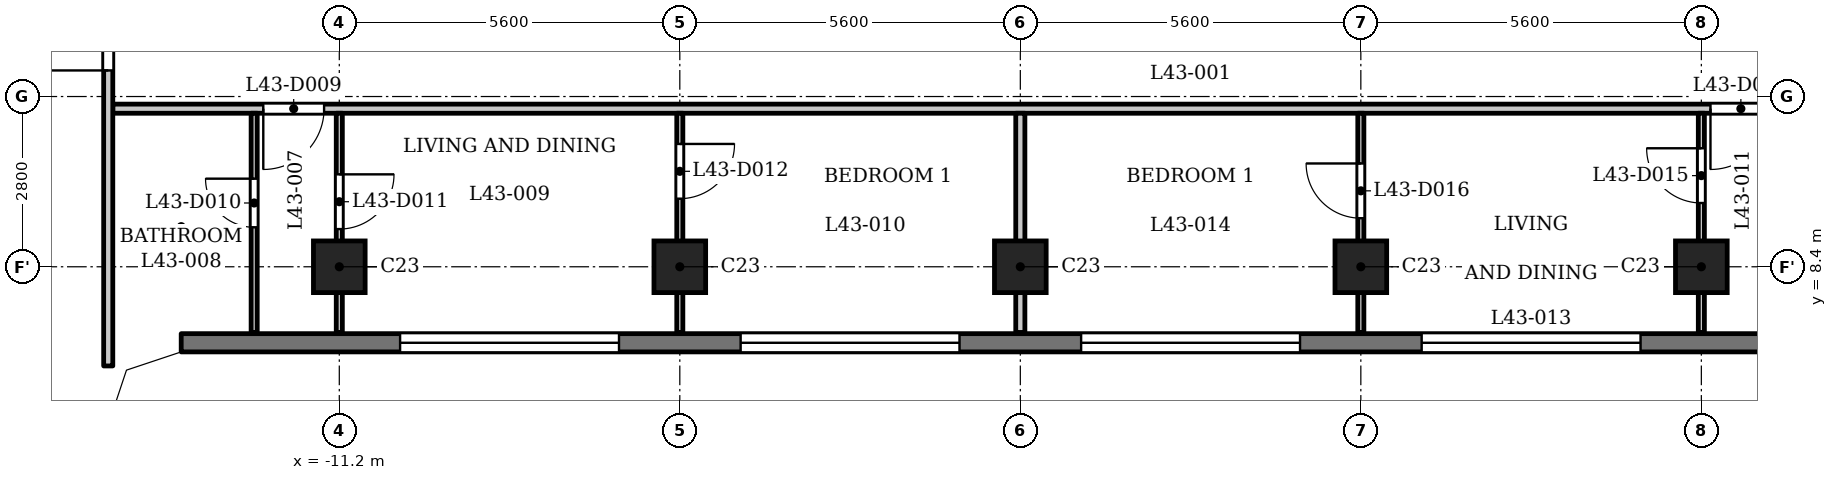
"""IFC4 building model, lengths in metres.
Left out: names, types, materials, properties, quantities, classifications, styles, units other than length and angle.
Written with IfcOpenShell. Run it as: python <this file> out.ifc"""

import sys

from ifc_helpers import new_model, si_unit, direction, frame, frame_2d, origin, origin_2d, place, context, subcontext, project, spatial, polyline, rectangle, outline, extrude, element, fill, save


model = new_model("IFC4")
c1 = context("Model", 3, precision=1e-05, world=origin(), true_north=direction((0.0, 1.0)))
c2 = subcontext(c1, "Body", "Model", "MODEL_VIEW")
j1 = project(units=[si_unit("LENGTHUNIT", "METRE"), si_unit("PLANEANGLEUNIT", "RADIAN")], contexts=[c1])
p1 = place(None, origin())
s1 = spatial("IfcSite", under=j1, at=p1, CompositionType="ELEMENT")
p2 = place(p1, origin())
s2 = spatial("IfcBuilding", under=s1, at=p2, CompositionType="ELEMENT")
p3 = place(p2, frame((0.0, 0.0, 167.6)))
s3 = spatial("IfcBuildingStorey", under=s2, at=p3, CompositionType="ELEMENT", Elevation=167.6)
for number, where, z_axis, x_axis in (
    (1, (-11.2, 8.4, 0.0), (0.0, 0.0, 1.0), (1.0, 0.0, 0.0)),
    (2, (-5.6, 8.4, 0.0), (0.0, 0.0, 1.0), (1.0, 0.0, 0.0)),
    (3, (0.0, 8.4, 0.0), (0.0, 0.0, 1.0), (1.0, 0.0, 0.0)),
    (4, (5.6, 8.4, 0.0), (0.0, 0.0, 1.0), (1.0, 0.0, 0.0)),
    (5, (11.2, 8.4, 0.0), (0.0, 0.0, 1.0), (1.0, 0.0, 0.0)),
):
    element("IfcColumn", number, at=place(p3, frame(where, z_axis=z_axis, x_axis=x_axis)), inside=s3, PredefinedType="COLUMN", context=c2, shape_type="SweptSolid", body=[
        extrude(rectangle(XDim=0.85, YDim=0.85, at=origin_2d()), origin(), (0.0, 0.0, 1.0), 3.5),
    ])
p4 = place(p3, frame((-13.8, 7.15, 0.0), z_axis=(0.0, 0.0, 1.0), x_axis=(1.0, 0.0, 0.0)))
e6 = element("IfcWall", 6, at=p4, inside=s3, PredefinedType="SOLIDWALL", context=c2, shape_type="SweptSolid", body=[
    extrude(rectangle(XDim=27.6, YDim=0.3, at=frame_2d((13.8, 0.0))), origin(), (0.0, 0.0, 1.0), 3.2),
])
p5 = place(p4, frame((3.6, 0.0, 1.2)))
e7 = element("IfcOpeningElement", 7, at=p5, cuts=e6, PredefinedType="OPENING", context=c2, shape_type="SweptSolid", body=[
    extrude(rectangle(XDim=3.6, YDim=0.95, at=frame_2d((1.8, 0.475))), frame((0.0, 0.16, 0.0), z_axis=(0.0, -1.0, 0.0), x_axis=(1.0, 0.0, 0.0)), (0.0, 0.0, 1.0), 0.32),
])
p6 = place(p4, frame((9.2, 0.0, 1.2)))
e8 = element("IfcOpeningElement", 8, at=p6, cuts=e6, PredefinedType="OPENING", context=c2, shape_type="SweptSolid", body=[
    extrude(rectangle(XDim=3.6, YDim=0.95, at=frame_2d((1.8, 0.475))), frame((0.0, 0.16, 0.0), z_axis=(0.0, -1.0, 0.0), x_axis=(1.0, 0.0, 0.0)), (0.0, 0.0, 1.0), 0.32),
])
p7 = place(p4, frame((14.8, 0.0, 1.2)))
e9 = element("IfcOpeningElement", 9, at=p7, cuts=e6, PredefinedType="OPENING", context=c2, shape_type="SweptSolid", body=[
    extrude(rectangle(XDim=3.6, YDim=0.95, at=frame_2d((1.8, 0.475))), frame((0.0, 0.16, 0.0), z_axis=(0.0, -1.0, 0.0), x_axis=(1.0, 0.0, 0.0)), (0.0, 0.0, 1.0), 0.32),
])
p8 = place(p4, frame((20.4, 0.0, 1.2)))
e10 = element("IfcOpeningElement", 10, at=p8, cuts=e6, PredefinedType="OPENING", context=c2, shape_type="SweptSolid", body=[
    extrude(rectangle(XDim=3.6, YDim=0.95, at=frame_2d((1.8, 0.475))), frame((0.0, 0.16, 0.0), z_axis=(0.0, -1.0, 0.0), x_axis=(1.0, 0.0, 0.0)), (0.0, 0.0, 1.0), 0.32),
])
p9 = place(p3, frame((-14.925, 11.0, 0.0), z_axis=(0.0, 0.0, 1.0), x_axis=(1.0, 0.0, 0.0)))
e11 = element("IfcWall", 11, at=p9, inside=s3, PredefinedType="PARTITIONING", context=c2, shape_type="SweptSolid", body=[
    extrude(rectangle(XDim=29.85, YDim=0.15, at=frame_2d((14.925, 0.0))), origin(), (0.0, 0.0, 1.0), 3.2),
])
p10 = place(p9, frame((2.475, 0.0, 0.0)))
e12 = element("IfcOpeningElement", 12, at=p10, cuts=e11, PredefinedType="OPENING", context=c2, shape_type="SweptSolid", body=[
    extrude(rectangle(XDim=1.0, YDim=2.1, at=frame_2d((0.5, 1.05))), frame((0.0, 0.085, 0.0), z_axis=(0.0, -1.0, 0.0), x_axis=(1.0, 0.0, 0.0)), (0.0, 0.0, 1.0), 0.17),
])
p11 = place(p9, frame((26.275, 0.0, 0.0)))
e13 = element("IfcOpeningElement", 13, at=p11, cuts=e11, PredefinedType="OPENING", context=c2, shape_type="SweptSolid", body=[
    extrude(rectangle(XDim=1.0, YDim=2.1, at=frame_2d((0.5, 1.05))), frame((0.0, 0.085, 0.0), z_axis=(0.0, -1.0, 0.0), x_axis=(1.0, 0.0, 0.0)), (0.0, 0.0, 1.0), 0.17),
])
p12 = place(p3, frame((-15.0, 6.769, 0.0), z_axis=(0.0, 0.0, 1.0), x_axis=(0.0, 1.0, 0.0)))
e14 = element("IfcWall", 14, at=p12, inside=s3, PredefinedType="PARTITIONING", context=c2, shape_type="SweptSolid", body=[
    extrude(rectangle(XDim=6.356, YDim=0.15, at=frame_2d((3.178, 0.0))), origin(), (0.0, 0.0, 1.0), 3.2),
])
p13 = place(p12, frame((4.86, 0.0, 0.0)))
e15 = element("IfcOpeningElement", 15, at=p13, cuts=e14, PredefinedType="OPENING", context=c2, shape_type="SweptSolid", body=[
    extrude(rectangle(XDim=1.0, YDim=2.1, at=frame_2d((0.5, 1.05))), frame((0.0, 0.085, 0.0), z_axis=(0.0, -1.0, 0.0), x_axis=(1.0, 0.0, 0.0)), (0.0, 0.0, 1.0), 0.17),
])
p14 = place(p3, frame((-12.6, 7.32, 0.0), z_axis=(0.0, 0.0, 1.0), x_axis=(0.0, 1.0, 0.0)))
e16 = element("IfcWall", 16, at=p14, inside=s3, PredefinedType="PARTITIONING", context=c2, shape_type="SweptSolid", body=[
    extrude(rectangle(XDim=3.605, YDim=0.1, at=frame_2d((1.802, 0.0))), origin(), (0.0, 0.0, 1.0), 3.2),
])
p15 = place(p14, frame((1.729, 0.0, 0.0)))
e17 = element("IfcOpeningElement", 17, at=p15, cuts=e16, PredefinedType="OPENING", context=c2, shape_type="SweptSolid", body=[
    extrude(rectangle(XDim=0.8, YDim=2.1, at=frame_2d((0.4, 1.05))), frame((0.0, 0.06, 0.0), z_axis=(0.0, -1.0, 0.0), x_axis=(1.0, 0.0, 0.0)), (0.0, 0.0, 1.0), 0.12),
])
p16 = place(p3, frame((-11.2, 7.32, 0.0), z_axis=(0.0, 0.0, 1.0), x_axis=(0.0, 1.0, 0.0)))
e18 = element("IfcWall", 18, at=p16, inside=s3, PredefinedType="PARTITIONING", context=c2, shape_type="SweptSolid", body=[
    extrude(rectangle(XDim=3.605, YDim=0.1, at=frame_2d((1.802, 0.0))), origin(), (0.0, 0.0, 1.0), 3.2),
])
p17 = place(p16, frame((1.7, 0.0, 0.0)))
e19 = element("IfcOpeningElement", 19, at=p17, cuts=e18, PredefinedType="OPENING", context=c2, shape_type="SweptSolid", body=[
    extrude(rectangle(XDim=0.9, YDim=2.1, at=frame_2d((0.45, 1.05))), frame((0.0, 0.06, 0.0), z_axis=(0.0, -1.0, 0.0), x_axis=(1.0, 0.0, 0.0)), (0.0, 0.0, 1.0), 0.12),
])
p18 = place(p3, frame((-5.6, 7.32, 0.0), z_axis=(0.0, 0.0, 1.0), x_axis=(0.0, 1.0, 0.0)))
e20 = element("IfcWall", 20, at=p18, inside=s3, PredefinedType="PARTITIONING", context=c2, shape_type="SweptSolid", body=[
    extrude(rectangle(XDim=3.605, YDim=0.1, at=frame_2d((1.802, 0.0))), origin(), (0.0, 0.0, 1.0), 3.2),
])
p19 = place(p18, frame((2.2, 0.0, 0.0)))
e21 = element("IfcOpeningElement", 21, at=p19, cuts=e20, PredefinedType="OPENING", context=c2, shape_type="SweptSolid", body=[
    extrude(rectangle(XDim=0.9, YDim=2.1, at=frame_2d((0.45, 1.05))), frame((0.0, 0.06, 0.0), z_axis=(0.0, -1.0, 0.0), x_axis=(1.0, 0.0, 0.0)), (0.0, 0.0, 1.0), 0.12),
])
p20 = place(p3, frame((0.0, 7.32, 0.0), z_axis=(0.0, 0.0, 1.0), x_axis=(0.0, 1.0, 0.0)))
e22 = element("IfcWall", 22, at=p20, inside=s3, PredefinedType="PARTITIONING", context=c2, shape_type="SweptSolid", body=[
    extrude(rectangle(XDim=3.605, YDim=0.15, at=frame_2d((1.802, 0.0))), origin(), (0.0, 0.0, 1.0), 3.2),
])
p21 = place(p3, frame((5.6, 7.32, 0.0), z_axis=(0.0, 0.0, 1.0), x_axis=(0.0, 1.0, 0.0)))
e23 = element("IfcWall", 23, at=p21, inside=s3, PredefinedType="PARTITIONING", context=c2, shape_type="SweptSolid", body=[
    extrude(rectangle(XDim=3.605, YDim=0.1, at=frame_2d((1.802, 0.0))), origin(), (0.0, 0.0, 1.0), 3.2),
])
p22 = place(p21, frame((1.879, 0.0, 0.0)))
e24 = element("IfcOpeningElement", 24, at=p22, cuts=e23, PredefinedType="OPENING", context=c2, shape_type="SweptSolid", body=[
    extrude(rectangle(XDim=0.9, YDim=2.1, at=frame_2d((0.45, 1.05))), frame((0.0, 0.06, 0.0), z_axis=(0.0, -1.0, 0.0), x_axis=(1.0, 0.0, 0.0)), (0.0, 0.0, 1.0), 0.12),
])
p23 = place(p3, frame((11.2, 7.32, 0.0), z_axis=(0.0, 0.0, 1.0), x_axis=(0.0, 1.0, 0.0)))
e25 = element("IfcWall", 25, at=p23, inside=s3, PredefinedType="PARTITIONING", context=c2, shape_type="SweptSolid", body=[
    extrude(rectangle(XDim=3.605, YDim=0.1, at=frame_2d((1.802, 0.0))), origin(), (0.0, 0.0, 1.0), 3.2),
])
p24 = place(p23, frame((2.129, 0.0, 0.0)))
e26 = element("IfcOpeningElement", 26, at=p24, cuts=e25, PredefinedType="OPENING", context=c2, shape_type="SweptSolid", body=[
    extrude(rectangle(XDim=0.9, YDim=2.1, at=frame_2d((0.45, 1.05))), frame((0.0, 0.06, 0.0), z_axis=(0.0, -1.0, 0.0), x_axis=(1.0, 0.0, 0.0)), (0.0, 0.0, 1.0), 0.12),
])
p25 = place(p3, origin())
e27 = element("IfcWall", 27, at=p25, inside=s3, PredefinedType="SOLIDWALL", context=c2, shape_type="SweptSolid", body=[
    extrude(outline(polyline([(-13.849, 7.3), (-14.937, 6.937), (-15.3, 5.849), (-15.3, 5.8), (-15.0, 5.8), (-14.7, 6.7), (-13.8, 7.0), (-13.8, 7.3), (-13.849, 7.3)])), origin(), (0.0, 0.0, 1.0), 3.2),
])
p26 = place(p13, origin())
e28 = element("IfcDoor", 28, at=p26, inside=s3, OperationType="SINGLE_SWING_RIGHT", PredefinedType="DOOR", context=c2, shape_type="SweptSolid", body=[
    extrude(rectangle(XDim=1.0, YDim=2.1, at=frame_2d((0.5, 1.05))), frame((0.0, 0.025, 0.0), z_axis=(0.0, -1.0, 0.0), x_axis=(1.0, 0.0, 0.0)), (0.0, 0.0, 1.0), 0.05),
])
fill(e15, e28)
p27 = place(p10, origin())
e29 = element("IfcDoor", 29, at=p27, inside=s3, OperationType="SINGLE_SWING_LEFT", PredefinedType="DOOR", context=c2, shape_type="SweptSolid", body=[
    extrude(rectangle(XDim=1.0, YDim=2.1, at=frame_2d((0.5, 1.05))), frame((0.0, 0.025, 0.0), z_axis=(0.0, -1.0, 0.0), x_axis=(1.0, 0.0, 0.0)), (0.0, 0.0, 1.0), 0.05),
])
fill(e12, e29)
p28 = place(p15, origin())
e30 = element("IfcDoor", 30, at=p28, inside=s3, OperationType="SINGLE_SWING_LEFT", PredefinedType="DOOR", context=c2, shape_type="SweptSolid", body=[
    extrude(rectangle(XDim=0.8, YDim=2.1, at=frame_2d((0.4, 1.05))), frame((0.0, 0.025, 0.0), z_axis=(0.0, -1.0, 0.0), x_axis=(1.0, 0.0, 0.0)), (0.0, 0.0, 1.0), 0.05),
])
fill(e17, e30)
p29 = place(p17, origin())
e31 = element("IfcDoor", 31, at=p29, inside=s3, OperationType="SINGLE_SWING_RIGHT", PredefinedType="DOOR", context=c2, shape_type="SweptSolid", body=[
    extrude(rectangle(XDim=0.9, YDim=2.1, at=frame_2d((0.45, 1.05))), frame((0.0, 0.025, 0.0), z_axis=(0.0, -1.0, 0.0), x_axis=(1.0, 0.0, 0.0)), (0.0, 0.0, 1.0), 0.05),
])
fill(e19, e31)
p30 = place(p19, origin())
e32 = element("IfcDoor", 32, at=p30, inside=s3, OperationType="SINGLE_SWING_RIGHT", PredefinedType="DOOR", context=c2, shape_type="SweptSolid", body=[
    extrude(rectangle(XDim=0.9, YDim=2.1, at=frame_2d((0.45, 1.05))), frame((0.0, 0.025, 0.0), z_axis=(0.0, -1.0, 0.0), x_axis=(1.0, 0.0, 0.0)), (0.0, 0.0, 1.0), 0.05),
])
fill(e21, e32)
p31 = place(p11, origin())
e33 = element("IfcDoor", 33, at=p31, inside=s3, OperationType="SINGLE_SWING_LEFT", PredefinedType="DOOR", context=c2, shape_type="SweptSolid", body=[
    extrude(rectangle(XDim=1.0, YDim=2.1, at=frame_2d((0.5, 1.05))), frame((0.0, 0.025, 0.0), z_axis=(0.0, -1.0, 0.0), x_axis=(1.0, 0.0, 0.0)), (0.0, 0.0, 1.0), 0.05),
])
fill(e13, e33)
p32 = place(p24, origin())
e34 = element("IfcDoor", 34, at=p32, inside=s3, OperationType="SINGLE_SWING_LEFT", PredefinedType="DOOR", context=c2, shape_type="SweptSolid", body=[
    extrude(rectangle(XDim=0.9, YDim=2.1, at=frame_2d((0.45, 1.05))), frame((0.0, 0.025, 0.0), z_axis=(0.0, -1.0, 0.0), x_axis=(1.0, 0.0, 0.0)), (0.0, 0.0, 1.0), 0.05),
])
fill(e26, e34)
p33 = place(p22, origin())
e35 = element("IfcDoor", 35, at=p33, inside=s3, OperationType="SINGLE_SWING_LEFT", PredefinedType="DOOR", context=c2, shape_type="SweptSolid", body=[
    extrude(rectangle(XDim=0.9, YDim=2.1, at=frame_2d((0.45, 1.05))), frame((0.0, 0.025, 0.0), z_axis=(0.0, -1.0, 0.0), x_axis=(1.0, 0.0, 0.0)), (0.0, 0.0, 1.0), 0.05),
])
fill(e24, e35)
p34 = place(p5, origin())
e36 = element("IfcWindow", 36, at=p34, inside=s3, PartitioningType="SINGLE_PANEL", PredefinedType="WINDOW", context=c2, shape_type="SweptSolid", body=[
    extrude(rectangle(XDim=3.6, YDim=0.95, at=frame_2d((1.8, 0.475))), frame((0.0, 0.03, 0.0), z_axis=(0.0, -1.0, 0.0), x_axis=(1.0, 0.0, 0.0)), (0.0, 0.0, 1.0), 0.06),
])
fill(e7, e36)
p35 = place(p6, origin())
e37 = element("IfcWindow", 37, at=p35, inside=s3, PartitioningType="SINGLE_PANEL", PredefinedType="WINDOW", context=c2, shape_type="SweptSolid", body=[
    extrude(rectangle(XDim=3.6, YDim=0.95, at=frame_2d((1.8, 0.475))), frame((0.0, 0.03, 0.0), z_axis=(0.0, -1.0, 0.0), x_axis=(1.0, 0.0, 0.0)), (0.0, 0.0, 1.0), 0.06),
])
fill(e8, e37)
p36 = place(p7, origin())
e38 = element("IfcWindow", 38, at=p36, inside=s3, PartitioningType="SINGLE_PANEL", PredefinedType="WINDOW", context=c2, shape_type="SweptSolid", body=[
    extrude(rectangle(XDim=3.6, YDim=0.95, at=frame_2d((1.8, 0.475))), frame((0.0, 0.03, 0.0), z_axis=(0.0, -1.0, 0.0), x_axis=(1.0, 0.0, 0.0)), (0.0, 0.0, 1.0), 0.06),
])
fill(e9, e38)
p37 = place(p8, origin())
e39 = element("IfcWindow", 39, at=p37, inside=s3, PartitioningType="SINGLE_PANEL", PredefinedType="WINDOW", context=c2, shape_type="SweptSolid", body=[
    extrude(rectangle(XDim=3.6, YDim=0.95, at=frame_2d((1.8, 0.475))), frame((0.0, 0.03, 0.0), z_axis=(0.0, -1.0, 0.0), x_axis=(1.0, 0.0, 0.0)), (0.0, 0.0, 1.0), 0.06),
])
fill(e10, e39)
save(model, sys.argv[1])
